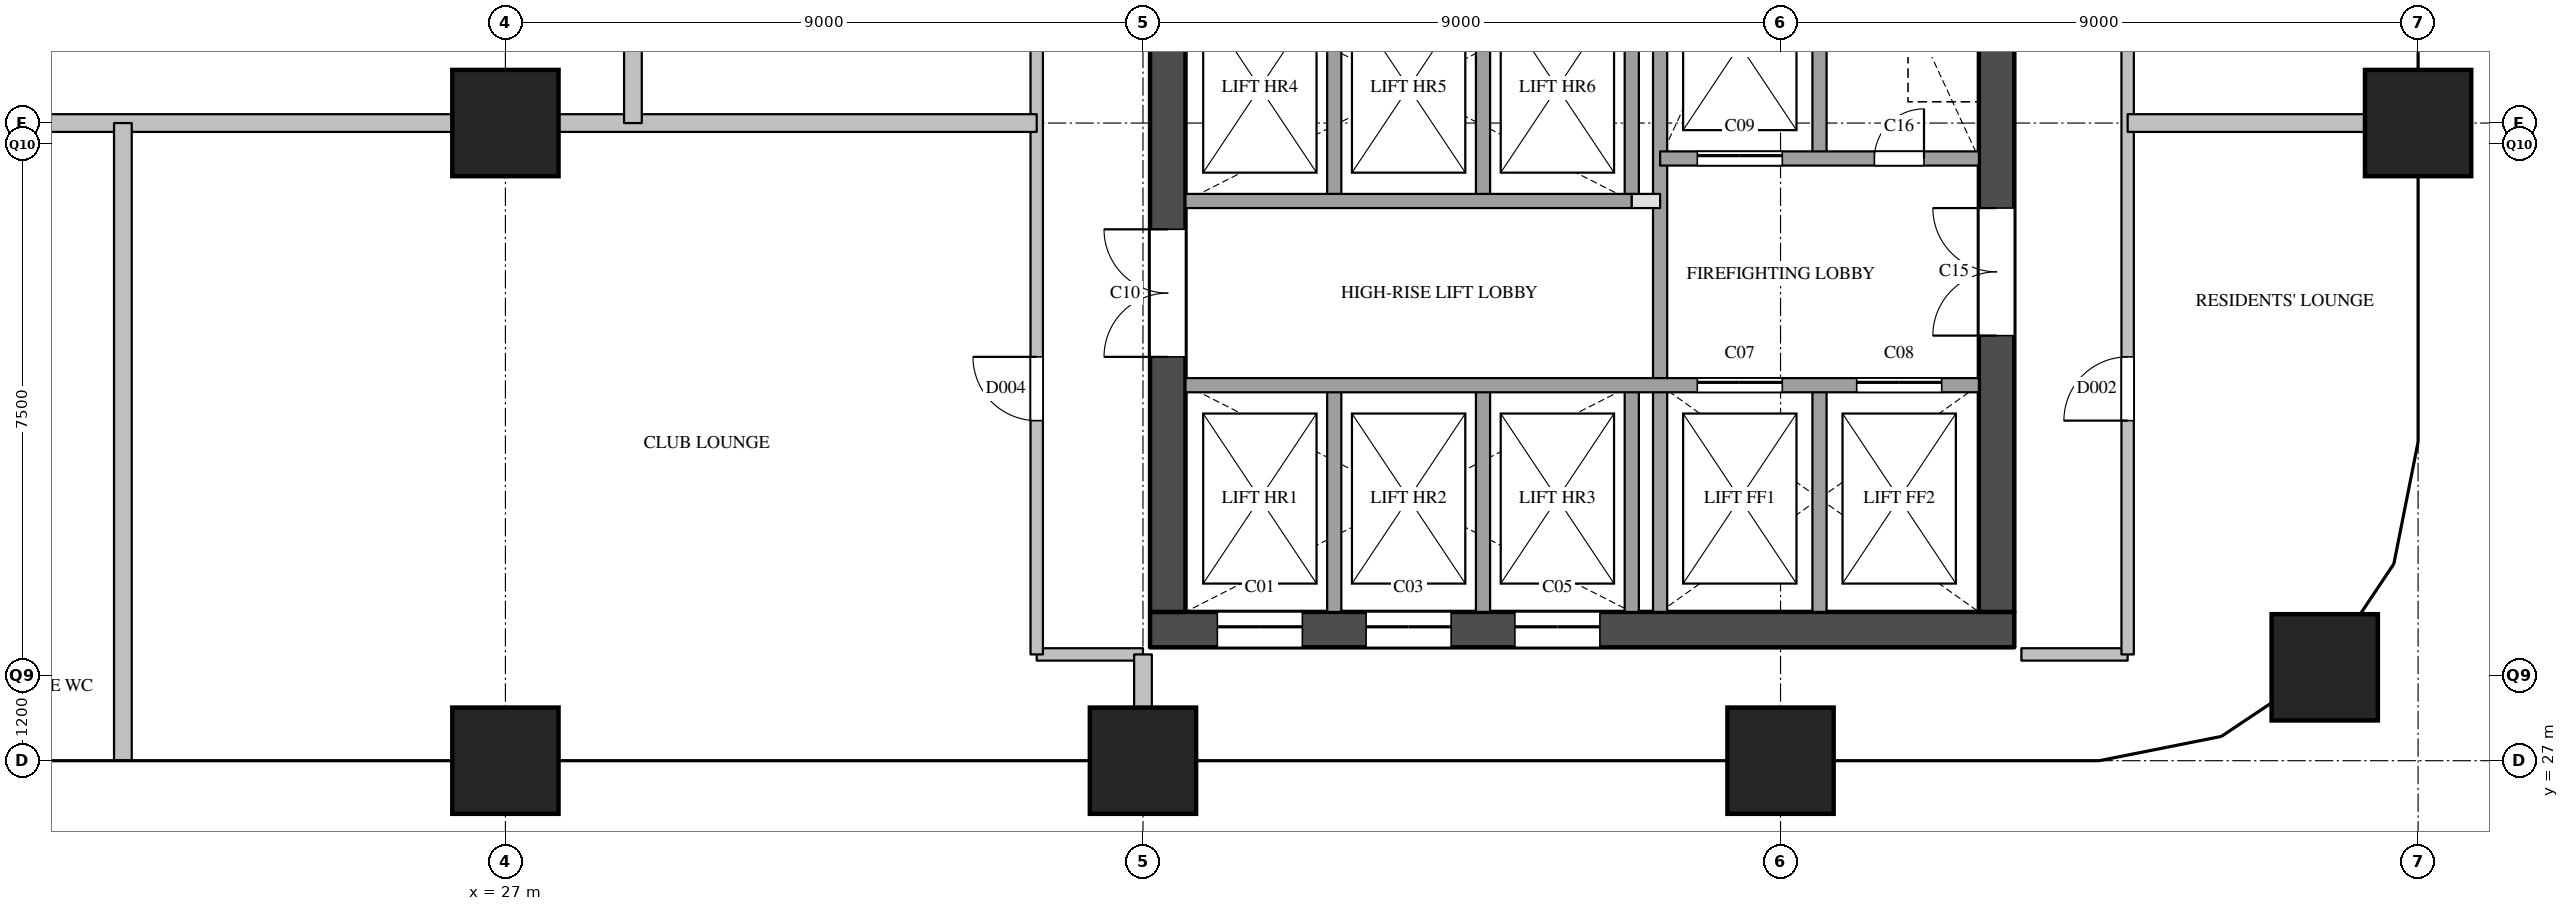
"""IFC4 building model, lengths in metres.
Left out: names, types, materials, properties, quantities, classifications, styles, units other than length and angle.
Written with IfcOpenShell. Run it as: python <this file> out.ifc"""

import sys

from ifc_helpers import new_model, si_unit, direction, frame, frame_2d, origin, origin_2d, place, context, subcontext, project, spatial, rectangle, extrude, element, fill, save


model = new_model("IFC4")
c1 = context("Model", 3, precision=1e-05, world=origin(), true_north=direction((0.0, 1.0)))
c2 = subcontext(c1, "Body", "Model", "MODEL_VIEW")
j1 = project(units=[si_unit("LENGTHUNIT", "METRE"), si_unit("PLANEANGLEUNIT", "RADIAN")], contexts=[c1])
p1 = place(None, origin())
s1 = spatial("IfcSite", under=j1, at=p1, CompositionType="ELEMENT")
p2 = place(p1, origin())
s2 = spatial("IfcBuilding", under=s1, at=p2, CompositionType="ELEMENT")
p3 = place(p2, frame((0.0, 0.0, 166.1)))
s3 = spatial("IfcBuildingStorey", under=s2, at=p3, CompositionType="ELEMENT", Elevation=166.1)
for number, where, z_axis, x_axis in (
    (1, (27.0, 27.0, 0.0), (0.0, 0.0, 1.0), (1.0, 0.0, 0.0)),
    (2, (27.0, 36.0, 0.0), (0.0, 0.0, 1.0), (1.0, 0.0, 0.0)),
    (3, (36.0, 27.0, 0.0), (0.0, 0.0, 1.0), (1.0, 0.0, 0.0)),
    (4, (45.0, 27.0, 0.0), (0.0, 0.0, 1.0), (1.0, 0.0, 0.0)),
    (5, (52.682, 28.318, 0.0), (0.0, 0.0, 1.0), (1.0, 0.0, 0.0)),
    (6, (54.0, 36.0, 0.0), (0.0, 0.0, 1.0), (1.0, 0.0, 0.0)),
):
    element("IfcColumn", number, at=place(p3, frame(where, z_axis=z_axis, x_axis=x_axis)), inside=s3, PredefinedType="COLUMN", context=c2, shape_type="SweptSolid", body=[
        extrude(rectangle(XDim=1.5, YDim=1.5, at=origin_2d()), origin(), (0.0, 0.0, 1.0), 3.9),
    ])
p4 = place(p3, frame((36.1, 28.85, 0.0), z_axis=(0.0, 0.0, 1.0), x_axis=(1.0, 0.0, 0.0)))
e7 = element("IfcWall", 7, at=p4, inside=s3, PredefinedType="SHEAR", context=c2, shape_type="SweptSolid", body=[
    extrude(rectangle(XDim=12.2, YDim=0.5, at=frame_2d((6.1, 0.0))), origin(), (0.0, 0.0, 1.0), 3.6),
])
p5 = place(p4, frame((0.95, 0.0, 0.0)))
e8 = element("IfcOpeningElement", 8, at=p5, cuts=e7, PredefinedType="OPENING", context=c2, shape_type="SweptSolid", body=[
    extrude(rectangle(XDim=1.2, YDim=2.1, at=frame_2d((0.6, 1.05))), frame((0.0, 0.26, 0.0), z_axis=(0.0, -1.0, 0.0), x_axis=(1.0, 0.0, 0.0)), (0.0, 0.0, 1.0), 0.52),
])
p6 = place(p4, frame((3.05, 0.0, 0.0)))
e9 = element("IfcOpeningElement", 9, at=p6, cuts=e7, PredefinedType="OPENING", context=c2, shape_type="SweptSolid", body=[
    extrude(rectangle(XDim=1.2, YDim=2.1, at=frame_2d((0.6, 1.05))), frame((0.0, 0.26, 0.0), z_axis=(0.0, -1.0, 0.0), x_axis=(1.0, 0.0, 0.0)), (0.0, 0.0, 1.0), 0.52),
])
p7 = place(p4, frame((5.15, 0.0, 0.0)))
e10 = element("IfcOpeningElement", 10, at=p7, cuts=e7, PredefinedType="OPENING", context=c2, shape_type="SweptSolid", body=[
    extrude(rectangle(XDim=1.2, YDim=2.1, at=frame_2d((0.6, 1.05))), frame((0.0, 0.26, 0.0), z_axis=(0.0, -1.0, 0.0), x_axis=(1.0, 0.0, 0.0)), (0.0, 0.0, 1.0), 0.52),
])
p8 = place(p3, frame((36.35, 29.1, 0.0), z_axis=(0.0, 0.0, 1.0), x_axis=(0.0, 1.0, 0.0)))
e11 = element("IfcWall", 11, at=p8, inside=s3, PredefinedType="SHEAR", context=c2, shape_type="SweptSolid", body=[
    extrude(rectangle(XDim=20.3, YDim=0.5, at=frame_2d((10.15, 0.0))), origin(), (0.0, 0.0, 1.0), 3.6),
])
p9 = place(p8, frame((3.6, 0.0, 0.0)))
e12 = element("IfcOpeningElement", 12, at=p9, cuts=e11, PredefinedType="OPENING", context=c2, shape_type="SweptSolid", body=[
    extrude(rectangle(XDim=1.8, YDim=2.1, at=frame_2d((0.9, 1.05))), frame((0.0, 0.26, 0.0), z_axis=(0.0, -1.0, 0.0), x_axis=(1.0, 0.0, 0.0)), (0.0, 0.0, 1.0), 0.52),
])
p10 = place(p8, frame((16.4, 0.0, 0.0)))
e13 = element("IfcOpeningElement", 13, at=p10, cuts=e11, PredefinedType="OPENING", context=c2, shape_type="SweptSolid", body=[
    extrude(rectangle(XDim=1.0, YDim=2.1, at=frame_2d((0.5, 1.05))), frame((0.0, 0.26, 0.0), z_axis=(0.0, -1.0, 0.0), x_axis=(1.0, 0.0, 0.0)), (0.0, 0.0, 1.0), 0.52),
])
p11 = place(p3, frame((48.05, 29.1, 0.0), z_axis=(0.0, 0.0, 1.0), x_axis=(0.0, 1.0, 0.0)))
e14 = element("IfcWall", 14, at=p11, inside=s3, PredefinedType="SHEAR", context=c2, shape_type="SweptSolid", body=[
    extrude(rectangle(XDim=20.3, YDim=0.5, at=frame_2d((10.15, 0.0))), origin(), (0.0, 0.0, 1.0), 3.6),
])
p12 = place(p11, frame((12.5, 0.0, 0.0)))
e15 = element("IfcOpeningElement", 15, at=p12, cuts=e14, PredefinedType="OPENING", context=c2, shape_type="SweptSolid", body=[
    extrude(rectangle(XDim=0.7, YDim=2.1, at=frame_2d((0.35, 1.05))), frame((0.0, 0.26, 0.0), z_axis=(0.0, -1.0, 0.0), x_axis=(1.0, 0.0, 0.0)), (0.0, 0.0, 1.0), 0.52),
])
p13 = place(p11, frame((3.9, 0.0, 0.0)))
e16 = element("IfcOpeningElement", 16, at=p13, cuts=e14, PredefinedType="OPENING", context=c2, shape_type="SweptSolid", body=[
    extrude(rectangle(XDim=1.8, YDim=2.1, at=frame_2d((0.9, 1.05))), frame((0.0, 0.26, 0.0), z_axis=(0.0, -1.0, 0.0), x_axis=(1.0, 0.0, 0.0)), (0.0, 0.0, 1.0), 0.52),
])
p14 = place(p3, frame((38.7, 29.1, 0.0), z_axis=(0.0, 0.0, 1.0), x_axis=(0.0, 1.0, 0.0)))
e17 = element("IfcWall", 17, at=p14, inside=s3, PredefinedType="SOLIDWALL", context=c2, shape_type="SweptSolid", body=[
    extrude(rectangle(XDim=3.2, YDim=0.2, at=frame_2d((1.6, 0.0))), origin(), (0.0, 0.0, 1.0), 3.6),
])
p15 = place(p3, frame((38.7, 34.9, 0.0), z_axis=(0.0, 0.0, 1.0), x_axis=(0.0, 1.0, 0.0)))
e18 = element("IfcWall", 18, at=p15, inside=s3, PredefinedType="SOLIDWALL", context=c2, shape_type="SweptSolid", body=[
    extrude(rectangle(XDim=3.2, YDim=0.2, at=frame_2d((1.6, 0.0))), origin(), (0.0, 0.0, 1.0), 3.6),
])
p16 = place(p3, frame((40.8, 29.1, 0.0), z_axis=(0.0, 0.0, 1.0), x_axis=(0.0, 1.0, 0.0)))
e19 = element("IfcWall", 19, at=p16, inside=s3, PredefinedType="SOLIDWALL", context=c2, shape_type="SweptSolid", body=[
    extrude(rectangle(XDim=3.2, YDim=0.2, at=frame_2d((1.6, 0.0))), origin(), (0.0, 0.0, 1.0), 3.6),
])
p17 = place(p3, frame((40.8, 34.9, 0.0), z_axis=(0.0, 0.0, 1.0), x_axis=(0.0, 1.0, 0.0)))
e20 = element("IfcWall", 20, at=p17, inside=s3, PredefinedType="SOLIDWALL", context=c2, shape_type="SweptSolid", body=[
    extrude(rectangle(XDim=3.2, YDim=0.2, at=frame_2d((1.6, 0.0))), origin(), (0.0, 0.0, 1.0), 3.6),
])
p18 = place(p3, frame((42.9, 29.1, 0.0), z_axis=(0.0, 0.0, 1.0), x_axis=(0.0, 1.0, 0.0)))
e21 = element("IfcWall", 21, at=p18, inside=s3, PredefinedType="SOLIDWALL", context=c2, shape_type="SweptSolid", body=[
    extrude(rectangle(XDim=3.2, YDim=0.2, at=frame_2d((1.6, 0.0))), origin(), (0.0, 0.0, 1.0), 3.6),
])
p19 = place(p3, frame((42.9, 34.9, 0.0), z_axis=(0.0, 0.0, 1.0), x_axis=(0.0, 1.0, 0.0)))
e22 = element("IfcWall", 22, at=p19, inside=s3, PredefinedType="SOLIDWALL", context=c2, shape_type="SweptSolid", body=[
    extrude(rectangle(XDim=3.2, YDim=0.2, at=frame_2d((1.6, 0.0))), origin(), (0.0, 0.0, 1.0), 3.6),
])
p20 = place(p3, frame((43.3, 29.1, 0.0), z_axis=(0.0, 0.0, 1.0), x_axis=(0.0, 1.0, 0.0)))
e23 = element("IfcWall", 23, at=p20, inside=s3, PredefinedType="SOLIDWALL", context=c2, shape_type="SweptSolid", body=[
    extrude(rectangle(XDim=9.9, YDim=0.2, at=frame_2d((4.95, 0.0))), origin(), (0.0, 0.0, 1.0), 3.6),
])
for number, where, z_axis, x_axis in (
    (24, (45.55, 29.1, 0.0), (0.0, 0.0, 1.0), (0.0, 1.0, 0.0)),
    (25, (45.55, 35.5, 0.0), (0.0, 0.0, 1.0), (0.0, 1.0, 0.0)),
):
    element("IfcWall", number, at=place(p3, frame(where, z_axis=z_axis, x_axis=x_axis)), inside=s3, PredefinedType="SOLIDWALL", context=c2, shape_type="SweptSolid", body=[
        extrude(rectangle(XDim=3.2, YDim=0.2, at=frame_2d((1.6, 0.0))), origin(), (0.0, 0.0, 1.0), 3.6),
    ])
p21 = place(p3, frame((36.6, 32.3, 0.0), z_axis=(0.0, 0.0, 1.0), x_axis=(1.0, 0.0, 0.0)))
e26 = element("IfcWall", 26, at=p21, inside=s3, PredefinedType="SOLIDWALL", context=c2, shape_type="SweptSolid", body=[
    extrude(rectangle(XDim=11.2, YDim=0.2, at=frame_2d((5.6, 0.0))), origin(), (0.0, 0.0, 1.0), 3.6),
])
p22 = place(p21, frame((7.225, 0.0, 0.0)))
e27 = element("IfcOpeningElement", 27, at=p22, cuts=e26, PredefinedType="OPENING", context=c2, shape_type="SweptSolid", body=[
    extrude(rectangle(XDim=1.2, YDim=2.1, at=frame_2d((0.6, 1.05))), frame((0.0, 0.11, 0.0), z_axis=(0.0, -1.0, 0.0), x_axis=(1.0, 0.0, 0.0)), (0.0, 0.0, 1.0), 0.22),
])
p23 = place(p21, frame((9.475, 0.0, 0.0)))
e28 = element("IfcOpeningElement", 28, at=p23, cuts=e26, PredefinedType="OPENING", context=c2, shape_type="SweptSolid", body=[
    extrude(rectangle(XDim=1.2, YDim=2.1, at=frame_2d((0.6, 1.05))), frame((0.0, 0.11, 0.0), z_axis=(0.0, -1.0, 0.0), x_axis=(1.0, 0.0, 0.0)), (0.0, 0.0, 1.0), 0.22),
])
p24 = place(p3, frame((42.9, 34.9, 0.0), z_axis=(0.0, 0.0, 1.0), x_axis=(1.0, 0.0, 0.0)))
e29 = element("IfcWall", 29, at=p24, inside=s3, PredefinedType="PARTITIONING", context=c2, shape_type="SweptSolid", body=[
    extrude(rectangle(XDim=0.4, YDim=0.2, at=frame_2d((0.2, 0.0))), origin(), (0.0, 0.0, 1.0), 3.6),
])
p25 = place(p3, frame((36.6, 34.9, 0.0), z_axis=(0.0, 0.0, 1.0), x_axis=(1.0, 0.0, 0.0)))
e30 = element("IfcWall", 30, at=p25, inside=s3, PredefinedType="SOLIDWALL", context=c2, shape_type="SweptSolid", body=[
    extrude(rectangle(XDim=6.3, YDim=0.2, at=frame_2d((3.15, 0.0))), origin(), (0.0, 0.0, 1.0), 3.6),
])
p26 = place(p3, frame((43.3, 35.5, 0.0), z_axis=(0.0, 0.0, 1.0), x_axis=(1.0, 0.0, 0.0)))
e31 = element("IfcWall", 31, at=p26, inside=s3, PredefinedType="SOLIDWALL", context=c2, shape_type="SweptSolid", body=[
    extrude(rectangle(XDim=4.5, YDim=0.2, at=frame_2d((2.25, 0.0))), origin(), (0.0, 0.0, 1.0), 3.6),
])
p27 = place(p26, frame((0.525, 0.0, 0.0)))
e32 = element("IfcOpeningElement", 32, at=p27, cuts=e31, PredefinedType="OPENING", context=c2, shape_type="SweptSolid", body=[
    extrude(rectangle(XDim=1.2, YDim=2.1, at=frame_2d((0.6, 1.05))), frame((0.0, 0.11, 0.0), z_axis=(0.0, -1.0, 0.0), x_axis=(1.0, 0.0, 0.0)), (0.0, 0.0, 1.0), 0.22),
])
p28 = place(p26, frame((3.025, 0.0, 0.0)))
e33 = element("IfcOpeningElement", 33, at=p28, cuts=e31, PredefinedType="OPENING", context=c2, shape_type="SweptSolid", body=[
    extrude(rectangle(XDim=0.7, YDim=2.1, at=frame_2d((0.35, 1.05))), frame((0.0, 0.11, 0.0), z_axis=(0.0, -1.0, 0.0), x_axis=(1.0, 0.0, 0.0)), (0.0, 0.0, 1.0), 0.22),
])
for number, where, z_axis, x_axis in (
    (34, (34.5, 28.5, 0.0), (0.0, 0.0, 1.0), (1.0, 0.0, 0.0)),
    (35, (48.4, 28.5, 0.0), (0.0, 0.0, 1.0), (1.0, 0.0, 0.0)),
):
    element("IfcWall", number, at=place(p3, frame(where, z_axis=z_axis, x_axis=x_axis)), inside=s3, PredefinedType="PARTITIONING", context=c2, shape_type="SweptSolid", body=[
        extrude(rectangle(XDim=1.5, YDim=0.175, at=frame_2d((0.75, 0.0))), origin(), (0.0, 0.0, 1.0), 3.6),
    ])
p29 = place(p3, frame((34.5, 28.5, 0.0), z_axis=(0.0, 0.0, 1.0), x_axis=(0.0, 1.0, 0.0)))
e36 = element("IfcWall", 36, at=p29, inside=s3, PredefinedType="PARTITIONING", context=c2, shape_type="SweptSolid", body=[
    extrude(rectangle(XDim=23.0, YDim=0.175, at=frame_2d((11.5, 0.0))), origin(), (0.0, 0.0, 1.0), 3.6),
])
p30 = place(p29, frame((3.3, 0.0, 0.0)))
e37 = element("IfcOpeningElement", 37, at=p30, cuts=e36, PredefinedType="OPENING", context=c2, shape_type="SweptSolid", body=[
    extrude(rectangle(XDim=0.9, YDim=2.1, at=frame_2d((0.45, 1.05))), frame((0.0, 0.097, 0.0), z_axis=(0.0, -1.0, 0.0), x_axis=(1.0, 0.0, 0.0)), (0.0, 0.0, 1.0), 0.195),
])
p31 = place(p29, frame((14.8, 0.0, 0.0)))
e38 = element("IfcOpeningElement", 38, at=p31, cuts=e36, PredefinedType="OPENING", context=c2, shape_type="SweptSolid", body=[
    extrude(rectangle(XDim=0.9, YDim=2.1, at=frame_2d((0.45, 1.05))), frame((0.0, 0.097, 0.0), z_axis=(0.0, -1.0, 0.0), x_axis=(1.0, 0.0, 0.0)), (0.0, 0.0, 1.0), 0.195),
])
p32 = place(p3, frame((49.9, 28.5, 0.0), z_axis=(0.0, 0.0, 1.0), x_axis=(0.0, 1.0, 0.0)))
e39 = element("IfcWall", 39, at=p32, inside=s3, PredefinedType="PARTITIONING", context=c2, shape_type="SweptSolid", body=[
    extrude(rectangle(XDim=23.0, YDim=0.175, at=frame_2d((11.5, 0.0))), origin(), (0.0, 0.0, 1.0), 3.6),
])
p33 = place(p32, frame((3.3, 0.0, 0.0)))
e40 = element("IfcOpeningElement", 40, at=p33, cuts=e39, PredefinedType="OPENING", context=c2, shape_type="SweptSolid", body=[
    extrude(rectangle(XDim=0.9, YDim=2.1, at=frame_2d((0.45, 1.05))), frame((0.0, 0.097, 0.0), z_axis=(0.0, -1.0, 0.0), x_axis=(1.0, 0.0, 0.0)), (0.0, 0.0, 1.0), 0.195),
])
p34 = place(p32, frame((8.85, 0.0, 0.0)))
e41 = element("IfcOpeningElement", 41, at=p34, cuts=e39, PredefinedType="OPENING", context=c2, shape_type="SweptSolid", body=[
    extrude(rectangle(XDim=0.9, YDim=2.1, at=frame_2d((0.45, 1.05))), frame((0.0, 0.097, 0.0), z_axis=(0.0, -1.0, 0.0), x_axis=(1.0, 0.0, 0.0)), (0.0, 0.0, 1.0), 0.195),
])
p35 = place(p32, frame((16.6, 0.0, 0.0)))
e42 = element("IfcOpeningElement", 42, at=p35, cuts=e39, PredefinedType="OPENING", context=c2, shape_type="SweptSolid", body=[
    extrude(rectangle(XDim=0.9, YDim=2.1, at=frame_2d((0.45, 1.05))), frame((0.0, 0.097, 0.0), z_axis=(0.0, -1.0, 0.0), x_axis=(1.0, 0.0, 0.0)), (0.0, 0.0, 1.0), 0.195),
])
p36 = place(p3, frame((19.5, 36.0, 0.0), z_axis=(0.0, 0.0, 1.0), x_axis=(1.0, 0.0, 0.0)))
e43 = element("IfcWall", 43, at=p36, inside=s3, PredefinedType="PARTITIONING", context=c2, shape_type="SweptSolid", body=[
    extrude(rectangle(XDim=15.0, YDim=0.25, at=frame_2d((7.5, 0.0))), origin(), (0.0, 0.0, 1.0), 3.6),
])
p37 = place(p3, frame((49.9, 36.0, 0.0), z_axis=(0.0, 0.0, 1.0), x_axis=(1.0, 0.0, 0.0)))
e44 = element("IfcWall", 44, at=p37, inside=s3, PredefinedType="PARTITIONING", context=c2, shape_type="SweptSolid", body=[
    extrude(rectangle(XDim=4.1, YDim=0.25, at=frame_2d((2.05, 0.0))), origin(), (0.0, 0.0, 1.0), 3.6),
])
p38 = place(p3, frame((21.6, 27.0, 0.0), z_axis=(0.0, 0.0, 1.0), x_axis=(0.0, 1.0, 0.0)))
e45 = element("IfcWall", 45, at=p38, inside=s3, PredefinedType="PARTITIONING", context=c2, shape_type="SweptSolid", body=[
    extrude(rectangle(XDim=9.0, YDim=0.25, at=frame_2d((4.5, 0.0))), origin(), (0.0, 0.0, 1.0), 2.6),
])
p39 = place(p3, frame((28.8, 36.0, 0.0), z_axis=(0.0, 0.0, 1.0), x_axis=(0.0, 1.0, 0.0)))
e46 = element("IfcWall", 46, at=p39, inside=s3, PredefinedType="PARTITIONING", context=c2, shape_type="SweptSolid", body=[
    extrude(rectangle(XDim=18.0, YDim=0.25, at=frame_2d((9.0, 0.0))), origin(), (0.0, 0.0, 1.0), 2.6),
])
p40 = place(p3, frame((36.0, 27.0, 0.0), z_axis=(0.0, 0.0, 1.0), x_axis=(0.0, 1.0, 0.0)))
e47 = element("IfcWall", 47, at=p40, inside=s3, PredefinedType="PARTITIONING", context=c2, shape_type="SweptSolid", body=[
    extrude(rectangle(XDim=1.5, YDim=0.25, at=frame_2d((0.75, 0.0))), origin(), (0.0, 0.0, 1.0), 3.6),
])
p41 = place(p5, origin())
e48 = element("IfcDoor", 48, at=p41, inside=s3, OperationType="SLIDING_TO_LEFT", PredefinedType="DOOR", context=c2, shape_type="SweptSolid", body=[
    extrude(rectangle(XDim=1.2, YDim=2.1, at=frame_2d((0.6, 1.05))), frame((0.0, 0.025, 0.0), z_axis=(0.0, -1.0, 0.0), x_axis=(1.0, 0.0, 0.0)), (0.0, 0.0, 1.0), 0.05),
])
fill(e8, e48)
p42 = place(p6, origin())
e49 = element("IfcDoor", 49, at=p42, inside=s3, OperationType="SLIDING_TO_LEFT", PredefinedType="DOOR", context=c2, shape_type="SweptSolid", body=[
    extrude(rectangle(XDim=1.2, YDim=2.1, at=frame_2d((0.6, 1.05))), frame((0.0, 0.025, 0.0), z_axis=(0.0, -1.0, 0.0), x_axis=(1.0, 0.0, 0.0)), (0.0, 0.0, 1.0), 0.05),
])
fill(e9, e49)
p43 = place(p7, origin())
e50 = element("IfcDoor", 50, at=p43, inside=s3, OperationType="SLIDING_TO_LEFT", PredefinedType="DOOR", context=c2, shape_type="SweptSolid", body=[
    extrude(rectangle(XDim=1.2, YDim=2.1, at=frame_2d((0.6, 1.05))), frame((0.0, 0.025, 0.0), z_axis=(0.0, -1.0, 0.0), x_axis=(1.0, 0.0, 0.0)), (0.0, 0.0, 1.0), 0.05),
])
fill(e10, e50)
p44 = place(p22, origin())
e51 = element("IfcDoor", 51, at=p44, inside=s3, OperationType="SLIDING_TO_LEFT", PredefinedType="DOOR", context=c2, shape_type="SweptSolid", body=[
    extrude(rectangle(XDim=1.2, YDim=2.1, at=frame_2d((0.6, 1.05))), frame((0.0, 0.025, 0.0), z_axis=(0.0, -1.0, 0.0), x_axis=(1.0, 0.0, 0.0)), (0.0, 0.0, 1.0), 0.05),
])
fill(e27, e51)
p45 = place(p23, origin())
e52 = element("IfcDoor", 52, at=p45, inside=s3, OperationType="SLIDING_TO_LEFT", PredefinedType="DOOR", context=c2, shape_type="SweptSolid", body=[
    extrude(rectangle(XDim=1.2, YDim=2.1, at=frame_2d((0.6, 1.05))), frame((0.0, 0.025, 0.0), z_axis=(0.0, -1.0, 0.0), x_axis=(1.0, 0.0, 0.0)), (0.0, 0.0, 1.0), 0.05),
])
fill(e28, e52)
p46 = place(p27, origin())
e53 = element("IfcDoor", 53, at=p46, inside=s3, OperationType="SLIDING_TO_LEFT", PredefinedType="DOOR", context=c2, shape_type="SweptSolid", body=[
    extrude(rectangle(XDim=1.2, YDim=2.1, at=frame_2d((0.6, 1.05))), frame((0.0, 0.025, 0.0), z_axis=(0.0, -1.0, 0.0), x_axis=(1.0, 0.0, 0.0)), (0.0, 0.0, 1.0), 0.05),
])
fill(e32, e53)
p47 = place(p9, origin())
e54 = element("IfcDoor", 54, at=p47, inside=s3, OperationType="DOUBLE_DOOR_SINGLE_SWING", PredefinedType="DOOR", context=c2, shape_type="SweptSolid", body=[
    extrude(rectangle(XDim=1.8, YDim=2.1, at=frame_2d((0.9, 1.05))), frame((0.0, 0.025, 0.0), z_axis=(0.0, -1.0, 0.0), x_axis=(1.0, 0.0, 0.0)), (0.0, 0.0, 1.0), 0.05),
])
fill(e12, e54)
p48 = place(p13, origin())
e55 = element("IfcDoor", 55, at=p48, inside=s3, OperationType="DOUBLE_DOOR_SINGLE_SWING", PredefinedType="DOOR", context=c2, shape_type="SweptSolid", body=[
    extrude(rectangle(XDim=1.8, YDim=2.1, at=frame_2d((0.9, 1.05))), frame((0.0, 0.025, 0.0), z_axis=(0.0, -1.0, 0.0), x_axis=(1.0, 0.0, 0.0)), (0.0, 0.0, 1.0), 0.05),
])
fill(e16, e55)
p49 = place(p28, origin())
e56 = element("IfcDoor", 56, at=p49, inside=s3, OperationType="SINGLE_SWING_RIGHT", PredefinedType="DOOR", context=c2, shape_type="SweptSolid", body=[
    extrude(rectangle(XDim=0.7, YDim=2.1, at=frame_2d((0.35, 1.05))), frame((0.0, 0.025, 0.0), z_axis=(0.0, -1.0, 0.0), x_axis=(1.0, 0.0, 0.0)), (0.0, 0.0, 1.0), 0.05),
])
fill(e33, e56)
p50 = place(p33, origin())
e57 = element("IfcDoor", 57, at=p50, inside=s3, OperationType="SINGLE_SWING_LEFT", PredefinedType="DOOR", context=c2, shape_type="SweptSolid", body=[
    extrude(rectangle(XDim=0.9, YDim=2.1, at=frame_2d((0.45, 1.05))), frame((0.0, 0.025, 0.0), z_axis=(0.0, -1.0, 0.0), x_axis=(1.0, 0.0, 0.0)), (0.0, 0.0, 1.0), 0.05),
])
fill(e40, e57)
p51 = place(p30, origin())
e58 = element("IfcDoor", 58, at=p51, inside=s3, OperationType="SINGLE_SWING_RIGHT", PredefinedType="DOOR", context=c2, shape_type="SweptSolid", body=[
    extrude(rectangle(XDim=0.9, YDim=2.1, at=frame_2d((0.45, 1.05))), frame((0.0, 0.025, 0.0), z_axis=(0.0, -1.0, 0.0), x_axis=(1.0, 0.0, 0.0)), (0.0, 0.0, 1.0), 0.05),
])
fill(e37, e58)
save(model, sys.argv[1])
